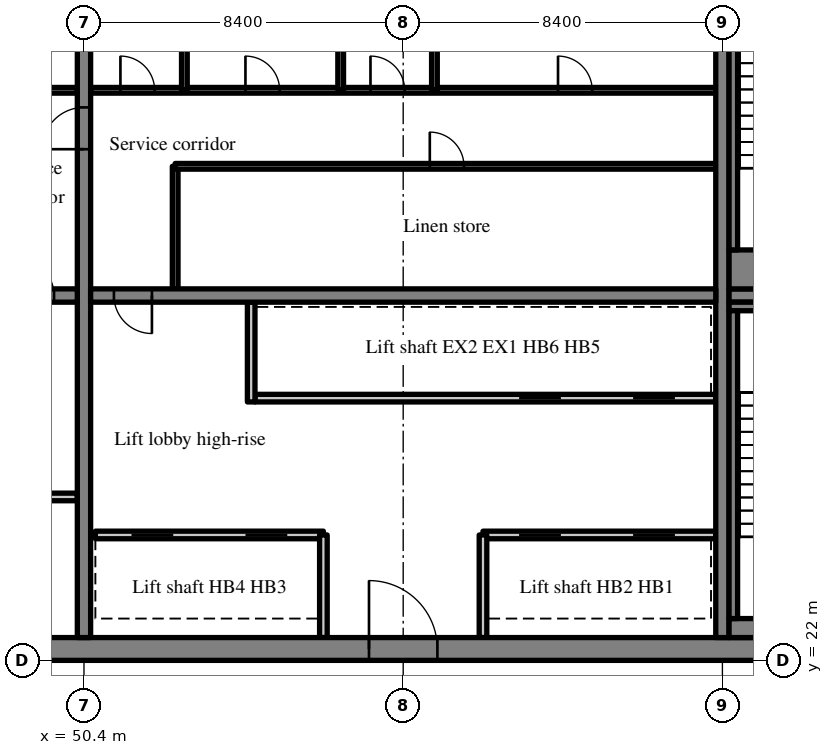
"""IFC4 building model, lengths in metres.
Left out: names, types, materials, properties, quantities, classifications, styles, units other than length and angle.
Written with IfcOpenShell. Run it as: python <this file> out.ifc"""

import sys

from ifc_helpers import new_model, si_unit, direction, frame, frame_2d, origin, place, context, subcontext, project, spatial, rectangle, extrude, source, transform, mapped, element, fill, save


model = new_model("IFC4")
c1 = context("Model", 3, precision=1e-05, world=origin(), true_north=direction((0.0, 1.0)))
c2 = subcontext(c1, "Body", "Model", "MODEL_VIEW")
j1 = project(units=[si_unit("LENGTHUNIT", "METRE"), si_unit("PLANEANGLEUNIT", "RADIAN")], contexts=[c1])
p1 = place(None, origin())
s1 = spatial("IfcSite", under=j1, at=p1, CompositionType="ELEMENT")
p2 = place(p1, origin())
s2 = spatial("IfcBuilding", under=s1, at=p2, CompositionType="ELEMENT")
p3 = place(p2, frame((0.0, 0.0, 225.7)))
s3 = spatial("IfcBuildingStorey", under=s2, at=p3, CompositionType="ELEMENT", Elevation=225.7)
m1 = source(origin(), c2, "Body", "SweptSolid", [
    extrude(rectangle(XDim=50.4, YDim=0.6, at=frame_2d((25.2, 0.0))), origin(), (0.0, 0.0, 1.0), 3.62),
])
p4 = place(p3, frame((25.2, 22.3, 0.0), z_axis=(0.0, 0.0, 1.0), x_axis=(1.0, 0.0, 0.0)))
e1 = element("IfcWall", 1, at=p4, inside=s3, PredefinedType="SHEAR", context=c2, shape_type="MappedRepresentation", body=[
    mapped(m1, transform((0.0, 0.0, 0.0), scale=1.0)),
])
m2 = source(origin(), c2, "Body", "SweptSolid", [
    extrude(rectangle(XDim=1.8, YDim=2.1, at=frame_2d((0.9, 1.05))), frame((0.0, 0.31, 0.0), z_axis=(0.0, -1.0, 0.0), x_axis=(1.0, 0.0, 0.0)), (0.0, 0.0, 1.0), 0.62),
])
p5 = place(p4, frame((15.9, 0.0, 0.0)))
e2 = element("IfcOpeningElement", 2, at=p5, cuts=e1, PredefinedType="OPENING", context=c2, shape_type="MappedRepresentation", body=[
    mapped(m2, transform((0.0, 0.0, 0.0), scale=1.0)),
])
m3 = source(origin(), c2, "Body", "SweptSolid", [
    extrude(rectangle(XDim=0.9, YDim=2.1, at=frame_2d((0.45, 1.05))), frame((0.0, 0.31, 0.0), z_axis=(0.0, -1.0, 0.0), x_axis=(1.0, 0.0, 0.0)), (0.0, 0.0, 1.0), 0.62),
])
p6 = place(p4, frame((11.187, 0.0, 0.0)))
e3 = element("IfcOpeningElement", 3, at=p6, cuts=e1, PredefinedType="OPENING", context=c2, shape_type="MappedRepresentation", body=[
    mapped(m3, transform((0.0, 0.0, 0.0), scale=1.0)),
])
p7 = place(p4, frame((21.513, 0.0, 0.0)))
e4 = element("IfcOpeningElement", 4, at=p7, cuts=e1, PredefinedType="OPENING", context=c2, shape_type="MappedRepresentation", body=[
    mapped(m3, transform((0.0, 0.0, 0.0), scale=1.0)),
])
p8 = place(p4, frame((32.7, 0.0, 0.0)))
e5 = element("IfcOpeningElement", 5, at=p8, cuts=e1, PredefinedType="OPENING", context=c2, shape_type="MappedRepresentation", body=[
    mapped(m2, transform((0.0, 0.0, 0.0), scale=1.0)),
])
m4 = source(origin(), c2, "Body", "SweptSolid", [
    extrude(rectangle(XDim=1.2, YDim=2.1, at=frame_2d((0.6, 1.05))), frame((0.0, 0.31, 0.0), z_axis=(0.0, -1.0, 0.0), x_axis=(1.0, 0.0, 0.0)), (0.0, 0.0, 1.0), 0.62),
])
p9 = place(p4, frame((6.488, 0.0, 0.0)))
e6 = element("IfcOpeningElement", 6, at=p9, cuts=e1, PredefinedType="OPENING", context=c2, shape_type="MappedRepresentation", body=[
    mapped(m4, transform((0.0, 0.0, 0.0), scale=1.0)),
])
p10 = place(p4, frame((47.925, 0.0, 0.0)))
e7 = element("IfcOpeningElement", 7, at=p10, cuts=e1, PredefinedType="OPENING", context=c2, shape_type="MappedRepresentation", body=[
    mapped(m4, transform((0.0, 0.0, 0.0), scale=1.0)),
])
m5 = source(origin(), c2, "Body", "SweptSolid", [
    extrude(rectangle(XDim=18.8, YDim=0.35, at=frame_2d((9.4, 0.0))), origin(), (0.0, 0.0, 1.0), 3.62),
])
p11 = place(p3, frame((50.4, 22.6, 0.0), z_axis=(0.0, 0.0, 1.0), x_axis=(0.0, 1.0, 0.0)))
e8 = element("IfcWall", 8, at=p11, inside=s3, PredefinedType="SHEAR", context=c2, shape_type="MappedRepresentation", body=[
    mapped(m5, transform((0.0, 0.0, 0.0), scale=1.0)),
])
m6 = source(origin(), c2, "Body", "SweptSolid", [
    extrude(rectangle(XDim=1.1, YDim=2.1, at=frame_2d((0.55, 1.05))), frame((0.0, 0.185, 0.0), z_axis=(0.0, -1.0, 0.0), x_axis=(1.0, 0.0, 0.0)), (0.0, 0.0, 1.0), 0.37),
])
p12 = place(p11, frame((12.85, 0.0, 0.0)))
e9 = element("IfcOpeningElement", 9, at=p12, cuts=e8, PredefinedType="OPENING", context=c2, shape_type="MappedRepresentation", body=[
    mapped(m6, transform((0.0, 0.0, 0.0), scale=1.0)),
])
p13 = place(p3, frame((67.2, 22.6, 0.0), z_axis=(0.0, 0.0, 1.0), x_axis=(0.0, 1.0, 0.0)))
e10 = element("IfcWall", 10, at=p13, inside=s3, PredefinedType="SHEAR", context=c2, shape_type="MappedRepresentation", body=[
    mapped(m5, transform((0.0, 0.0, 0.0), scale=1.0)),
])
m7 = source(origin(), c2, "Body", "SweptSolid", [
    extrude(rectangle(XDim=16.45, YDim=0.35, at=frame_2d((8.225, 0.0))), origin(), (0.0, 0.0, 1.0), 3.62),
])
p14 = place(p3, frame((33.775, 31.6, 0.0), z_axis=(0.0, 0.0, 1.0), x_axis=(1.0, 0.0, 0.0)))
e11 = element("IfcWall", 11, at=p14, inside=s3, PredefinedType="SHEAR", context=c2, shape_type="MappedRepresentation", body=[
    mapped(m7, transform((0.0, 0.0, 0.0), scale=1.0)),
])
m8 = source(origin(), c2, "Body", "SweptSolid", [
    extrude(rectangle(XDim=1.0, YDim=2.1, at=frame_2d((0.5, 1.05))), frame((0.0, 0.185, 0.0), z_axis=(0.0, -1.0, 0.0), x_axis=(1.0, 0.0, 0.0)), (0.0, 0.0, 1.0), 0.37),
])
p15 = place(p14, frame((14.837, 0.0, 0.0)))
e12 = element("IfcOpeningElement", 12, at=p15, cuts=e11, PredefinedType="OPENING", context=c2, shape_type="MappedRepresentation", body=[
    mapped(m8, transform((0.0, 0.0, 0.0), scale=1.0)),
])
m9 = source(origin(), c2, "Body", "SweptSolid", [
    extrude(rectangle(XDim=16.45, YDim=0.35, at=frame_2d((8.225, 0.0))), origin(), (0.0, 0.0, 1.0), 3.62),
])
p16 = place(p3, frame((50.575, 31.6, 0.0), z_axis=(0.0, 0.0, 1.0), x_axis=(1.0, 0.0, 0.0)))
e13 = element("IfcWall", 13, at=p16, inside=s3, PredefinedType="SHEAR", context=c2, shape_type="MappedRepresentation", body=[
    mapped(m9, transform((0.0, 0.0, 0.0), scale=1.0)),
])
p17 = place(p16, frame((0.613, 0.0, 0.0)))
e14 = element("IfcOpeningElement", 14, at=p17, cuts=e13, PredefinedType="OPENING", context=c2, shape_type="MappedRepresentation", body=[
    mapped(m8, transform((0.0, 0.0, 0.0), scale=1.0)),
])
m10 = source(origin(), c2, "Body", "SweptSolid", [
    extrude(rectangle(XDim=7.625, YDim=0.35, at=frame_2d((3.812, 0.0))), origin(), (0.0, 0.0, 1.0), 3.62),
])
p18 = place(p3, frame((67.375, 31.6, 0.0), z_axis=(0.0, 0.0, 1.0), x_axis=(1.0, 0.0, 0.0)))
e15 = element("IfcWall", 15, at=p18, inside=s3, PredefinedType="SHEAR", context=c2, shape_type="MappedRepresentation", body=[
    mapped(m10, transform((0.0, 0.0, 0.0), scale=1.0)),
])
p19 = place(p18, frame((5.8, 0.0, 0.0)))
e16 = element("IfcOpeningElement", 16, at=p19, cuts=e15, PredefinedType="OPENING", context=c2, shape_type="MappedRepresentation", body=[
    mapped(m6, transform((0.0, 0.0, 0.0), scale=1.0)),
])
m11 = source(origin(), c2, "Body", "SweptSolid", [
    extrude(rectangle(XDim=6.125, YDim=0.2, at=frame_2d((3.062, 0.0))), origin(), (0.0, 0.0, 1.0), 3.62),
])
p20 = place(p3, frame((44.1, 26.3, 0.0), z_axis=(0.0, 0.0, 1.0), x_axis=(1.0, 0.0, 0.0)))
e17 = element("IfcWall", 17, at=p20, inside=s3, PredefinedType="PARTITIONING", context=c2, shape_type="MappedRepresentation", body=[
    mapped(m11, transform((0.0, 0.0, 0.0), scale=1.0)),
])
m12 = source(origin(), c2, "Body", "SweptSolid", [
    extrude(rectangle(XDim=16.45, YDim=0.15, at=frame_2d((8.225, 0.0))), origin(), (0.0, 0.0, 1.0), 3.62),
])
p21 = place(p3, frame((33.775, 37.0, 0.0), z_axis=(0.0, 0.0, 1.0), x_axis=(1.0, 0.0, 0.0)))
e18 = element("IfcWall", 18, at=p21, inside=s3, PredefinedType="PARTITIONING", context=c2, shape_type="MappedRepresentation", body=[
    mapped(m12, transform((0.0, 0.0, 0.0), scale=1.0)),
])
m13 = source(origin(), c2, "Body", "SweptSolid", [
    extrude(rectangle(XDim=0.9, YDim=2.1, at=frame_2d((0.45, 1.05))), frame((0.0, 0.085, 0.0), z_axis=(0.0, -1.0, 0.0), x_axis=(1.0, 0.0, 0.0)), (0.0, 0.0, 1.0), 0.17),
])
p22 = place(p21, frame((1.606, 0.0, 0.0)))
e19 = element("IfcOpeningElement", 19, at=p22, cuts=e18, PredefinedType="OPENING", context=c2, shape_type="MappedRepresentation", body=[
    mapped(m13, transform((0.0, 0.0, 0.0), scale=1.0)),
])
p23 = place(p21, frame((7.364, 0.0, 0.0)))
e20 = element("IfcOpeningElement", 20, at=p23, cuts=e18, PredefinedType="OPENING", context=c2, shape_type="MappedRepresentation", body=[
    mapped(m13, transform((0.0, 0.0, 0.0), scale=1.0)),
])
p24 = place(p21, frame((12.299, 0.0, 0.0)))
e21 = element("IfcOpeningElement", 21, at=p24, cuts=e18, PredefinedType="OPENING", context=c2, shape_type="MappedRepresentation", body=[
    mapped(m13, transform((0.0, 0.0, 0.0), scale=1.0)),
])
p25 = place(p21, frame((14.766, 0.0, 0.0)))
e22 = element("IfcOpeningElement", 22, at=p25, cuts=e18, PredefinedType="OPENING", context=c2, shape_type="MappedRepresentation", body=[
    mapped(m13, transform((0.0, 0.0, 0.0), scale=1.0)),
])
p26 = place(p3, frame((67.025, 25.3, 0.0), z_axis=(0.0, 0.0, 1.0), x_axis=(-1.0, 0.0, 0.0)))
e23 = element("IfcWall", 23, at=p26, inside=s3, PredefinedType="SOLIDWALL", context=c2, shape_type="MappedRepresentation", body=[
    mapped(m11, transform((0.0, 0.0, 0.0), scale=1.0)),
])
m14 = source(origin(), c2, "Body", "SweptSolid", [
    extrude(rectangle(XDim=1.1, YDim=2.1, at=frame_2d((0.55, 1.05))), frame((0.0, 0.11, 0.0), z_axis=(0.0, -1.0, 0.0), x_axis=(1.0, 0.0, 0.0)), (0.0, 0.0, 1.0), 0.22),
])
p27 = place(p26, frame((1.075, 0.0, 0.0)))
e24 = element("IfcOpeningElement", 24, at=p27, cuts=e23, PredefinedType="OPENING", context=c2, shape_type="MappedRepresentation", body=[
    mapped(m14, transform((0.0, 0.0, 0.0), scale=1.0)),
])
p28 = place(p26, frame((4.075, 0.0, 0.0)))
e25 = element("IfcOpeningElement", 25, at=p28, cuts=e23, PredefinedType="OPENING", context=c2, shape_type="MappedRepresentation", body=[
    mapped(m14, transform((0.0, 0.0, 0.0), scale=1.0)),
])
m15 = source(origin(), c2, "Body", "SweptSolid", [
    extrude(rectangle(XDim=6.0, YDim=0.2, at=frame_2d((3.0, 0.0))), origin(), (0.0, 0.0, 1.0), 3.62),
])
p29 = place(p3, frame((56.7, 25.3, 0.0), z_axis=(0.0, 0.0, 1.0), x_axis=(-1.0, 0.0, 0.0)))
e26 = element("IfcWall", 26, at=p29, inside=s3, PredefinedType="SOLIDWALL", context=c2, shape_type="MappedRepresentation", body=[
    mapped(m15, transform((0.0, 0.0, 0.0), scale=1.0)),
])
p30 = place(p29, frame((0.95, 0.0, 0.0)))
e27 = element("IfcOpeningElement", 27, at=p30, cuts=e26, PredefinedType="OPENING", context=c2, shape_type="MappedRepresentation", body=[
    mapped(m14, transform((0.0, 0.0, 0.0), scale=1.0)),
])
p31 = place(p29, frame((3.95, 0.0, 0.0)))
e28 = element("IfcOpeningElement", 28, at=p31, cuts=e26, PredefinedType="OPENING", context=c2, shape_type="MappedRepresentation", body=[
    mapped(m14, transform((0.0, 0.0, 0.0), scale=1.0)),
])
m16 = source(origin(), c2, "Body", "SweptSolid", [
    extrude(rectangle(XDim=12.125, YDim=0.2, at=frame_2d((6.062, 0.0))), origin(), (0.0, 0.0, 1.0), 3.62),
])
p32 = place(p3, frame((67.025, 28.9, 0.0), z_axis=(0.0, 0.0, 1.0), x_axis=(-1.0, 0.0, 0.0)))
e29 = element("IfcWall", 29, at=p32, inside=s3, PredefinedType="SOLIDWALL", context=c2, shape_type="MappedRepresentation", body=[
    mapped(m16, transform((0.0, 0.0, 0.0), scale=1.0)),
])
p33 = place(p32, frame((1.075, 0.0, 0.0)))
e30 = element("IfcOpeningElement", 30, at=p33, cuts=e29, PredefinedType="OPENING", context=c2, shape_type="MappedRepresentation", body=[
    mapped(m14, transform((0.0, 0.0, 0.0), scale=1.0)),
])
p34 = place(p32, frame((4.075, 0.0, 0.0)))
e31 = element("IfcOpeningElement", 31, at=p34, cuts=e29, PredefinedType="OPENING", context=c2, shape_type="MappedRepresentation", body=[
    mapped(m14, transform((0.0, 0.0, 0.0), scale=1.0)),
])
m17 = source(origin(), c2, "Body", "SweptSolid", [
    extrude(rectangle(XDim=2.7, YDim=0.2, at=frame_2d((1.35, 0.0))), origin(), (0.0, 0.0, 1.0), 3.62),
])
for number, where, z_axis, x_axis in (
    (32, (60.9, 22.6, 0.0), (0.0, 0.0, 1.0), (0.0, 1.0, 0.0)),
    (33, (56.7, 22.6, 0.0), (0.0, 0.0, 1.0), (0.0, 1.0, 0.0)),
):
    element("IfcWall", number, at=place(p3, frame(where, z_axis=z_axis, x_axis=x_axis)), inside=s3, PredefinedType="SOLIDWALL", context=c2, shape_type="MappedRepresentation", body=[
        mapped(m17, transform((0.0, 0.0, 0.0), scale=1.0)),
    ])
m18 = source(origin(), c2, "Body", "SweptSolid", [
    extrude(rectangle(XDim=2.625, YDim=0.2, at=frame_2d((1.312, 0.0))), origin(), (0.0, 0.0, 1.0), 3.62),
])
p35 = place(p3, frame((54.8, 28.8, 0.0), z_axis=(0.0, 0.0, 1.0), x_axis=(0.0, 1.0, 0.0)))
e34 = element("IfcWall", 34, at=p35, inside=s3, PredefinedType="SOLIDWALL", context=c2, shape_type="MappedRepresentation", body=[
    mapped(m18, transform((0.0, 0.0, 0.0), scale=1.0)),
])
m19 = source(origin(), c2, "Body", "SweptSolid", [
    extrude(rectangle(XDim=3.225, YDim=0.15, at=frame_2d((1.613, 0.0))), origin(), (0.0, 0.0, 1.0), 3.62),
])
p36 = place(p3, frame((52.8, 31.775, 0.0), z_axis=(0.0, 0.0, 1.0), x_axis=(0.0, 1.0, 0.0)))
e35 = element("IfcWall", 35, at=p36, inside=s3, PredefinedType="PARTITIONING", context=c2, shape_type="MappedRepresentation", body=[
    mapped(m19, transform((0.0, 0.0, 0.0), scale=1.0)),
])
m20 = source(origin(), c2, "Body", "SweptSolid", [
    extrude(rectangle(XDim=14.225, YDim=0.15, at=frame_2d((7.112, 0.0))), origin(), (0.0, 0.0, 1.0), 3.62),
])
p37 = place(p3, frame((67.025, 35.0, 0.0), z_axis=(0.0, 0.0, 1.0), x_axis=(-1.0, 0.0, 0.0)))
e36 = element("IfcWall", 36, at=p37, inside=s3, PredefinedType="PARTITIONING", context=c2, shape_type="MappedRepresentation", body=[
    mapped(m20, transform((0.0, 0.0, 0.0), scale=1.0)),
])
p38 = place(p37, frame((6.625, 0.0, 0.0)))
e37 = element("IfcOpeningElement", 37, at=p38, cuts=e36, PredefinedType="OPENING", context=c2, shape_type="MappedRepresentation", body=[
    mapped(m13, transform((0.0, 0.0, 0.0), scale=1.0)),
])
m21 = source(origin(), c2, "Body", "SweptSolid", [
    extrude(rectangle(XDim=16.45, YDim=0.15, at=frame_2d((8.225, 0.0))), origin(), (0.0, 0.0, 1.0), 3.62),
])
p39 = place(p3, frame((67.025, 37.0, 0.0), z_axis=(0.0, 0.0, 1.0), x_axis=(-1.0, 0.0, 0.0)))
e38 = element("IfcWall", 38, at=p39, inside=s3, PredefinedType="PARTITIONING", context=c2, shape_type="MappedRepresentation", body=[
    mapped(m21, transform((0.0, 0.0, 0.0), scale=1.0)),
])
p40 = place(p39, frame((3.251, 0.0, 0.0)))
e39 = element("IfcOpeningElement", 39, at=p40, cuts=e38, PredefinedType="OPENING", context=c2, shape_type="MappedRepresentation", body=[
    mapped(m13, transform((0.0, 0.0, 0.0), scale=1.0)),
])
p41 = place(p39, frame((8.186, 0.0, 0.0)))
e40 = element("IfcOpeningElement", 40, at=p41, cuts=e38, PredefinedType="OPENING", context=c2, shape_type="MappedRepresentation", body=[
    mapped(m13, transform((0.0, 0.0, 0.0), scale=1.0)),
])
p42 = place(p39, frame((11.476, 0.0, 0.0)))
e41 = element("IfcOpeningElement", 41, at=p42, cuts=e38, PredefinedType="OPENING", context=c2, shape_type="MappedRepresentation", body=[
    mapped(m13, transform((0.0, 0.0, 0.0), scale=1.0)),
])
p43 = place(p39, frame((14.766, 0.0, 0.0)))
e42 = element("IfcOpeningElement", 42, at=p43, cuts=e38, PredefinedType="OPENING", context=c2, shape_type="MappedRepresentation", body=[
    mapped(m13, transform((0.0, 0.0, 0.0), scale=1.0)),
])
m22 = source(origin(), c2, "Body", "SweptSolid", [
    extrude(rectangle(XDim=4.4, YDim=0.15, at=frame_2d((2.2, 0.0))), origin(), (0.0, 0.0, 1.0), 3.62),
])
for number, where, z_axis, x_axis in (
    (43, (59.622, 37.0, 0.0), (0.0, 0.0, 1.0), (0.0, 1.0, 0.0)),
    (44, (57.155, 37.0, 0.0), (0.0, 0.0, 1.0), (0.0, 1.0, 0.0)),
    (45, (53.042, 37.0, 0.0), (0.0, 0.0, 1.0), (0.0, 1.0, 0.0)),
):
    element("IfcWall", number, at=place(p3, frame(where, z_axis=z_axis, x_axis=x_axis)), inside=s3, PredefinedType="PARTITIONING", context=c2, shape_type="MappedRepresentation", body=[
        mapped(m22, transform((0.0, 0.0, 0.0), scale=1.0)),
    ])
m23 = source(origin(), c2, "Body", "SweptSolid", [
    extrude(rectangle(XDim=4.875, YDim=0.5, at=frame_2d((2.438, 0.0))), origin(), (0.0, 0.0, 1.0), 3.62),
])
p44 = place(p3, frame((67.375, 22.85, 0.0), z_axis=(0.0, 0.0, 1.0), x_axis=(1.0, 0.0, 0.0)))
e46 = element("IfcWall", 46, at=p44, inside=s3, PredefinedType="SOLIDWALL", context=c2, shape_type="MappedRepresentation", body=[
    mapped(m23, transform((0.0, 0.0, 0.0), scale=1.0)),
])
m24 = source(origin(), c2, "Body", "SweptSolid", [
    extrude(rectangle(XDim=4.875, YDim=0.225, at=frame_2d((2.438, 0.0))), origin(), (0.0, 0.0, 1.0), 3.62),
])
p45 = place(p3, frame((67.375, 31.312, 0.0), z_axis=(0.0, 0.0, 1.0), x_axis=(1.0, 0.0, 0.0)))
e47 = element("IfcWall", 47, at=p45, inside=s3, PredefinedType="SOLIDWALL", context=c2, shape_type="MappedRepresentation", body=[
    mapped(m24, transform((0.0, 0.0, 0.0), scale=1.0)),
])
m25 = source(origin(), c2, "Body", "SweptSolid", [
    extrude(rectangle(XDim=8.1, YDim=0.225, at=frame_2d((4.05, 0.0))), origin(), (0.0, 0.0, 1.0), 3.62),
])
p46 = place(p3, frame((67.487, 23.1, 0.0), z_axis=(0.0, 0.0, 1.0), x_axis=(0.0, 1.0, 0.0)))
e48 = element("IfcWall", 48, at=p46, inside=s3, PredefinedType="SOLIDWALL", context=c2, shape_type="MappedRepresentation", body=[
    mapped(m25, transform((0.0, 0.0, 0.0), scale=1.0)),
])
m26 = source(origin(), c2, "Body", "SweptSolid", [
    extrude(rectangle(XDim=4.875, YDim=1.025, at=frame_2d((2.438, 0.0))), origin(), (0.0, 0.0, 1.0), 3.62),
])
p47 = place(p3, frame((67.375, 32.287, 0.0), z_axis=(0.0, 0.0, 1.0), x_axis=(1.0, 0.0, 0.0)))
e49 = element("IfcWall", 49, at=p47, inside=s3, PredefinedType="SOLIDWALL", context=c2, shape_type="MappedRepresentation", body=[
    mapped(m26, transform((0.0, 0.0, 0.0), scale=1.0)),
])
p48 = place(p3, frame((67.487, 32.8, 0.0), z_axis=(0.0, 0.0, 1.0), x_axis=(0.0, 1.0, 0.0)))
e50 = element("IfcWall", 50, at=p48, inside=s3, PredefinedType="SOLIDWALL", context=c2, shape_type="MappedRepresentation", body=[
    mapped(m25, transform((0.0, 0.0, 0.0), scale=1.0)),
])
m27 = source(origin(), c2, "Body", "SweptSolid", [
    extrude(rectangle(XDim=1.0, YDim=2.1, at=frame_2d((0.5, 1.05))), frame((0.0, 0.025, 0.0), z_axis=(0.0, -1.0, 0.0), x_axis=(1.0, 0.0, 0.0)), (0.0, 0.0, 1.0), 0.05),
])
p49 = place(p15, origin())
e51 = element("IfcDoor", 51, at=p49, inside=s3, OperationType="SINGLE_SWING_LEFT", PredefinedType="DOOR", context=c2, shape_type="MappedRepresentation", body=[
    mapped(m27, transform((0.0, 0.0, 0.0), scale=1.0)),
])
fill(e12, e51)
m28 = source(origin(), c2, "Body", "SweptSolid", [
    extrude(rectangle(XDim=1.8, YDim=2.1, at=frame_2d((0.9, 1.05))), frame((0.0, 0.225, 0.0), z_axis=(0.0, -1.0, 0.0), x_axis=(1.0, 0.0, 0.0)), (0.0, 0.0, 1.0), 0.05),
])
p50 = place(p8, origin())
e52 = element("IfcDoor", 52, at=p50, inside=s3, OperationType="DOUBLE_DOOR_SINGLE_SWING", PredefinedType="DOOR", context=c2, shape_type="MappedRepresentation", body=[
    mapped(m28, transform((0.0, 0.0, 0.0), scale=1.0)),
])
fill(e5, e52)
p51 = place(p17, origin())
e53 = element("IfcDoor", 53, at=p51, inside=s3, OperationType="SINGLE_SWING_RIGHT", PredefinedType="DOOR", context=c2, shape_type="MappedRepresentation", body=[
    mapped(m27, transform((0.0, 0.0, 0.0), scale=1.0)),
])
fill(e14, e53)
m29 = source(origin(), c2, "Body", "SweptSolid", [
    extrude(rectangle(XDim=1.1, YDim=2.1, at=frame_2d((0.55, 1.05))), frame((0.0, 0.025, 0.0), z_axis=(0.0, -1.0, 0.0), x_axis=(1.0, 0.0, 0.0)), (0.0, 0.0, 1.0), 0.05),
])
p52 = place(p27, origin())
e54 = element("IfcDoor", 54, at=p52, inside=s3, OperationType="SLIDING_TO_RIGHT", PredefinedType="DOOR", context=c2, shape_type="MappedRepresentation", body=[
    mapped(m29, transform((0.0, 0.0, 0.0), scale=1.0)),
])
fill(e24, e54)
p53 = place(p28, origin())
e55 = element("IfcDoor", 55, at=p53, inside=s3, OperationType="SLIDING_TO_LEFT", PredefinedType="DOOR", context=c2, shape_type="MappedRepresentation", body=[
    mapped(m29, transform((0.0, 0.0, 0.0), scale=1.0)),
])
fill(e25, e55)
p54 = place(p30, origin())
e56 = element("IfcDoor", 56, at=p54, inside=s3, OperationType="SLIDING_TO_RIGHT", PredefinedType="DOOR", context=c2, shape_type="MappedRepresentation", body=[
    mapped(m29, transform((0.0, 0.0, 0.0), scale=1.0)),
])
fill(e27, e56)
p55 = place(p31, origin())
e57 = element("IfcDoor", 57, at=p55, inside=s3, OperationType="SLIDING_TO_LEFT", PredefinedType="DOOR", context=c2, shape_type="MappedRepresentation", body=[
    mapped(m29, transform((0.0, 0.0, 0.0), scale=1.0)),
])
fill(e28, e57)
p56 = place(p33, origin())
e58 = element("IfcDoor", 58, at=p56, inside=s3, OperationType="SLIDING_TO_RIGHT", PredefinedType="DOOR", context=c2, shape_type="MappedRepresentation", body=[
    mapped(m29, transform((0.0, 0.0, 0.0), scale=1.0)),
])
fill(e30, e58)
p57 = place(p34, origin())
e59 = element("IfcDoor", 59, at=p57, inside=s3, OperationType="SLIDING_TO_LEFT", PredefinedType="DOOR", context=c2, shape_type="MappedRepresentation", body=[
    mapped(m29, transform((0.0, 0.0, 0.0), scale=1.0)),
])
fill(e31, e59)
m30 = source(origin(), c2, "Body", "SweptSolid", [
    extrude(rectangle(XDim=0.9, YDim=2.1, at=frame_2d((0.45, 1.05))), frame((0.0, 0.025, 0.0), z_axis=(0.0, -1.0, 0.0), x_axis=(1.0, 0.0, 0.0)), (0.0, 0.0, 1.0), 0.05),
])
p58 = place(p38, origin())
e60 = element("IfcDoor", 60, at=p58, inside=s3, OperationType="SINGLE_SWING_RIGHT", PredefinedType="DOOR", context=c2, shape_type="MappedRepresentation", body=[
    mapped(m30, transform((0.0, 0.0, 0.0), scale=1.0)),
])
fill(e37, e60)
p59 = place(p40, origin())
e61 = element("IfcDoor", 61, at=p59, inside=s3, OperationType="SINGLE_SWING_RIGHT", PredefinedType="DOOR", context=c2, shape_type="MappedRepresentation", body=[
    mapped(m30, transform((0.0, 0.0, 0.0), scale=1.0)),
])
fill(e39, e61)
p60 = place(p41, origin())
e62 = element("IfcDoor", 62, at=p60, inside=s3, OperationType="SINGLE_SWING_RIGHT", PredefinedType="DOOR", context=c2, shape_type="MappedRepresentation", body=[
    mapped(m30, transform((0.0, 0.0, 0.0), scale=1.0)),
])
fill(e40, e62)
p61 = place(p42, origin())
e63 = element("IfcDoor", 63, at=p61, inside=s3, OperationType="SINGLE_SWING_RIGHT", PredefinedType="DOOR", context=c2, shape_type="MappedRepresentation", body=[
    mapped(m30, transform((0.0, 0.0, 0.0), scale=1.0)),
])
fill(e41, e63)
p62 = place(p43, origin())
e64 = element("IfcDoor", 64, at=p62, inside=s3, OperationType="SINGLE_SWING_RIGHT", PredefinedType="DOOR", context=c2, shape_type="MappedRepresentation", body=[
    mapped(m30, transform((0.0, 0.0, 0.0), scale=1.0)),
])
fill(e42, e64)
p63 = place(p12, origin())
e65 = element("IfcDoor", 65, at=p63, inside=s3, OperationType="SINGLE_SWING_LEFT", PredefinedType="DOOR", context=c2, shape_type="MappedRepresentation", body=[
    mapped(m29, transform((0.0, 0.0, 0.0), scale=1.0)),
])
fill(e9, e65)
save(model, sys.argv[1])
